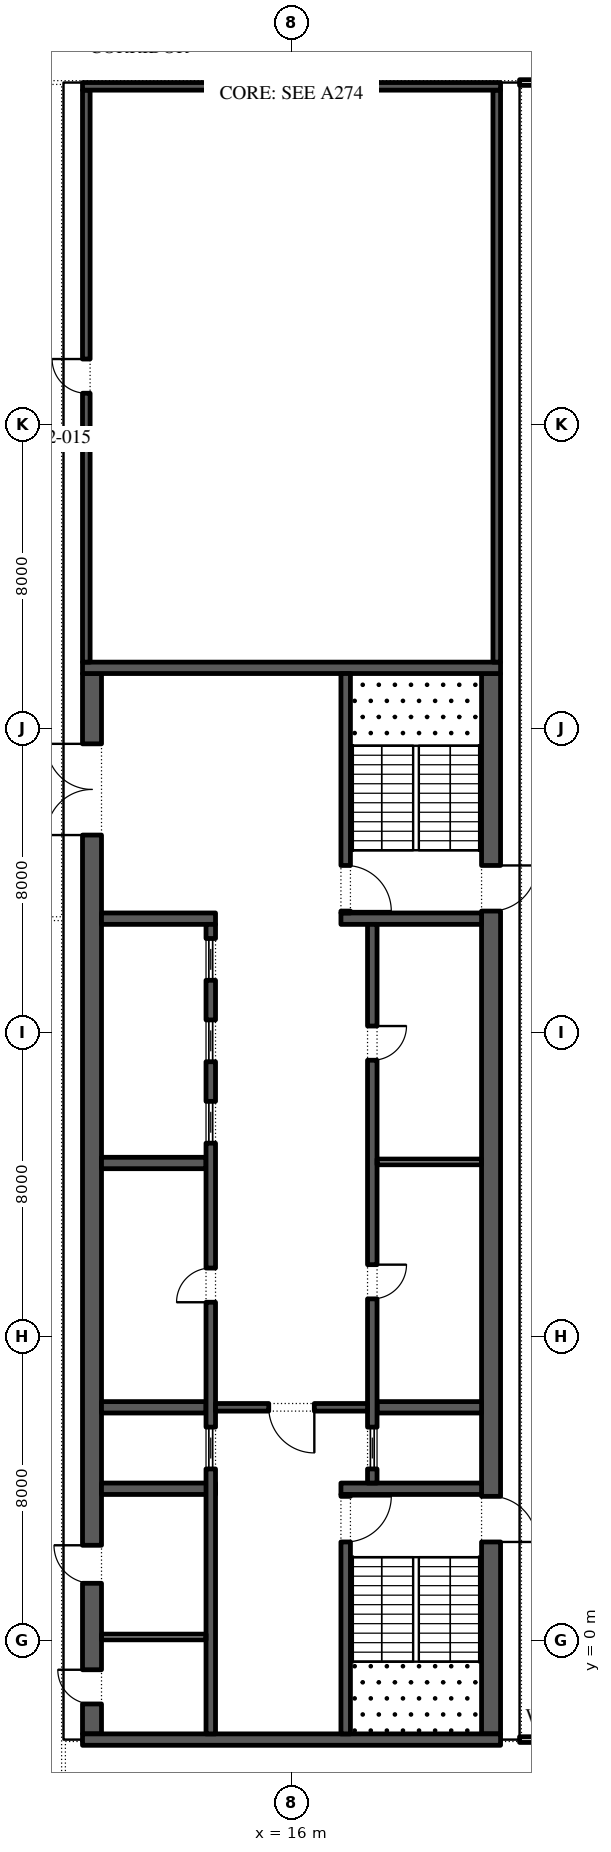
"""IFC4 building model, lengths in metres.
Left out: names, types, materials, properties, quantities, classifications, styles, units other than length and angle.
Written with IfcOpenShell. Run it as: python <this file> out.ifc"""

import sys

from ifc_helpers import new_model, si_unit, direction, frame, frame_2d, origin, place, context, subcontext, project, spatial, rectangle, extrude, element, fill, save


model = new_model("IFC4")
c1 = context("Model", 3, precision=1e-05, world=origin(), true_north=direction((0.0, 1.0)))
c2 = subcontext(c1, "Body", "Model", "MODEL_VIEW")
j1 = project(units=[si_unit("LENGTHUNIT", "METRE"), si_unit("PLANEANGLEUNIT", "RADIAN")], contexts=[c1])
p1 = place(None, origin())
s1 = spatial("IfcSite", under=j1, at=p1, CompositionType="ELEMENT")
p2 = place(p1, origin())
s2 = spatial("IfcBuilding", under=s1, at=p2, CompositionType="ELEMENT")
p3 = place(p2, frame((0.0, 0.0, 325.8)))
s3 = spatial("IfcBuildingStorey", under=s2, at=p3, CompositionType="ELEMENT", Elevation=325.8)
p4 = place(p3, frame((21.25, -2.45, 0.0), z_axis=(0.0, 0.0, 1.0), x_axis=(0.0, 1.0, 0.0)))
e1 = element("IfcWall", 1, at=p4, inside=s3, PredefinedType="SHEAR", context=c2, shape_type="SweptSolid", body=[
    extrude(rectangle(XDim=27.9, YDim=0.5, at=frame_2d((13.95, 0.0))), origin(), (0.0, 0.0, 1.0), 4.0),
])
p5 = place(p4, frame((5.05, 0.0, 0.0)))
e2 = element("IfcOpeningElement", 2, at=p5, cuts=e1, PredefinedType="OPENING", context=c2, shape_type="SweptSolid", body=[
    extrude(rectangle(XDim=1.2, YDim=2.1, at=frame_2d((0.6, 1.05))), frame((0.0, 0.26, 0.0), z_axis=(0.0, -1.0, 0.0), x_axis=(1.0, 0.0, 0.0)), (0.0, 0.0, 1.0), 0.52),
])
p6 = place(p4, frame((21.65, 0.0, 0.0)))
e3 = element("IfcOpeningElement", 3, at=p6, cuts=e1, PredefinedType="OPENING", context=c2, shape_type="SweptSolid", body=[
    extrude(rectangle(XDim=1.2, YDim=2.1, at=frame_2d((0.6, 1.05))), frame((0.0, 0.26, 0.0), z_axis=(0.0, -1.0, 0.0), x_axis=(1.0, 0.0, 0.0)), (0.0, 0.0, 1.0), 0.52),
])
p7 = place(p3, frame((10.75, -2.45, 0.0), z_axis=(0.0, 0.0, 1.0), x_axis=(0.0, 1.0, 0.0)))
e4 = element("IfcWall", 4, at=p7, inside=s3, PredefinedType="SHEAR", context=c2, shape_type="SweptSolid", body=[
    extrude(rectangle(XDim=27.9, YDim=0.5, at=frame_2d((13.95, 0.0))), origin(), (0.0, 0.0, 1.0), 4.0),
])
p8 = place(p7, frame((23.65, 0.0, 0.0)))
e5 = element("IfcOpeningElement", 5, at=p8, cuts=e4, PredefinedType="OPENING", context=c2, shape_type="SweptSolid", body=[
    extrude(rectangle(XDim=2.4, YDim=2.1, at=frame_2d((1.2, 1.05))), frame((0.0, 0.26, 0.0), z_axis=(0.0, -1.0, 0.0), x_axis=(1.0, 0.0, 0.0)), (0.0, 0.0, 1.0), 0.52),
])
p9 = place(p7, frame((0.788, 0.0, 0.0)))
e6 = element("IfcOpeningElement", 6, at=p9, cuts=e4, PredefinedType="OPENING", context=c2, shape_type="SweptSolid", body=[
    extrude(rectangle(XDim=0.9, YDim=2.1, at=frame_2d((0.45, 1.05))), frame((0.0, 0.26, 0.0), z_axis=(0.0, -1.0, 0.0), x_axis=(1.0, 0.0, 0.0)), (0.0, 0.0, 1.0), 0.52),
])
p10 = place(p7, frame((3.962, 0.0, 0.0)))
e7 = element("IfcOpeningElement", 7, at=p10, cuts=e4, PredefinedType="OPENING", context=c2, shape_type="SweptSolid", body=[
    extrude(rectangle(XDim=1.0, YDim=2.1, at=frame_2d((0.5, 1.05))), frame((0.0, 0.26, 0.0), z_axis=(0.0, -1.0, 0.0), x_axis=(1.0, 0.0, 0.0)), (0.0, 0.0, 1.0), 0.52),
])
for number, where, z_axis, x_axis in (
    (8, (10.5, -2.6, 0.0), (0.0, 0.0, 1.0), (1.0, 0.0, 0.0)),
    (9, (10.5, 25.6, 0.0), (0.0, 0.0, 1.0), (1.0, 0.0, 0.0)),
):
    element("IfcWall", number, at=place(p3, frame(where, z_axis=z_axis, x_axis=x_axis)), inside=s3, PredefinedType="SHEAR", context=c2, shape_type="SweptSolid", body=[
        extrude(rectangle(XDim=11.0, YDim=0.3, at=frame_2d((5.5, 0.0))), origin(), (0.0, 0.0, 1.0), 4.0),
    ])
p11 = place(p3, frame((17.3, 4.0, 0.0), z_axis=(0.0, 0.0, 1.0), x_axis=(1.0, 0.0, 0.0)))
e10 = element("IfcWall", 10, at=p11, inside=s3, PredefinedType="SHEAR", context=c2, shape_type="SweptSolid", body=[
    extrude(rectangle(XDim=3.7, YDim=0.3, at=frame_2d((1.85, 0.0))), origin(), (0.0, 0.0, 1.0), 4.0),
])
p12 = place(p3, frame((17.425, -2.45, 0.0), z_axis=(0.0, 0.0, 1.0), x_axis=(0.0, 1.0, 0.0)))
e11 = element("IfcWall", 11, at=p12, inside=s3, PredefinedType="SHEAR", context=c2, shape_type="SweptSolid", body=[
    extrude(rectangle(XDim=6.3, YDim=0.25, at=frame_2d((3.15, 0.0))), origin(), (0.0, 0.0, 1.0), 4.0),
])
p13 = place(p12, frame((5.05, 0.0, 0.0)))
e12 = element("IfcOpeningElement", 12, at=p13, cuts=e11, PredefinedType="OPENING", context=c2, shape_type="SweptSolid", body=[
    extrude(rectangle(XDim=1.2, YDim=2.1, at=frame_2d((0.6, 1.05))), frame((0.0, 0.135, 0.0), z_axis=(0.0, -1.0, 0.0), x_axis=(1.0, 0.0, 0.0)), (0.0, 0.0, 1.0), 0.27),
])
p14 = place(p3, frame((17.3, 19.0, 0.0), z_axis=(0.0, 0.0, 1.0), x_axis=(1.0, 0.0, 0.0)))
e13 = element("IfcWall", 13, at=p14, inside=s3, PredefinedType="SHEAR", context=c2, shape_type="SweptSolid", body=[
    extrude(rectangle(XDim=3.7, YDim=0.3, at=frame_2d((1.85, 0.0))), origin(), (0.0, 0.0, 1.0), 4.0),
])
p15 = place(p3, frame((17.425, 19.15, 0.0), z_axis=(0.0, 0.0, 1.0), x_axis=(0.0, 1.0, 0.0)))
e14 = element("IfcWall", 14, at=p15, inside=s3, PredefinedType="SHEAR", context=c2, shape_type="SweptSolid", body=[
    extrude(rectangle(XDim=6.3, YDim=0.25, at=frame_2d((3.15, 0.0))), origin(), (0.0, 0.0, 1.0), 4.0),
])
p16 = place(p15, frame((0.05, 0.0, 0.0)))
e15 = element("IfcOpeningElement", 15, at=p16, cuts=e14, PredefinedType="OPENING", context=c2, shape_type="SweptSolid", body=[
    extrude(rectangle(XDim=1.2, YDim=2.1, at=frame_2d((0.6, 1.05))), frame((0.0, 0.135, 0.0), z_axis=(0.0, -1.0, 0.0), x_axis=(1.0, 0.0, 0.0)), (0.0, 0.0, 1.0), 0.27),
])
p17 = place(p3, frame((18.25, 6.143, 0.0), z_axis=(0.0, 0.0, 1.0), x_axis=(1.0, 0.0, 0.0)))
e16 = element("IfcWall", 16, at=p17, inside=s3, PredefinedType="SHEAR", context=c2, shape_type="SweptSolid", body=[
    extrude(rectangle(XDim=2.75, YDim=0.3, at=frame_2d((1.375, 0.0))), origin(), (0.0, 0.0, 1.0), 4.0),
])
p18 = place(p3, frame((18.125, 4.15, 0.0), z_axis=(0.0, 0.0, 1.0), x_axis=(0.0, 1.0, 0.0)))
e17 = element("IfcWall", 17, at=p18, inside=s3, PredefinedType="SHEAR", context=c2, shape_type="SweptSolid", body=[
    extrude(rectangle(XDim=14.7, YDim=0.25, at=frame_2d((7.35, 0.0))), origin(), (0.0, 0.0, 1.0), 4.0),
])
p19 = place(p18, frame((4.846, 0.0, 0.0)))
e18 = element("IfcOpeningElement", 18, at=p19, cuts=e17, PredefinedType="OPENING", context=c2, shape_type="SweptSolid", body=[
    extrude(rectangle(XDim=0.9, YDim=2.1, at=frame_2d((0.45, 1.05))), frame((0.0, 0.135, 0.0), z_axis=(0.0, -1.0, 0.0), x_axis=(1.0, 0.0, 0.0)), (0.0, 0.0, 1.0), 0.27),
])
p20 = place(p18, frame((11.125, 0.0, 0.0)))
e19 = element("IfcOpeningElement", 19, at=p20, cuts=e17, PredefinedType="OPENING", context=c2, shape_type="SweptSolid", body=[
    extrude(rectangle(XDim=0.9, YDim=2.1, at=frame_2d((0.45, 1.05))), frame((0.0, 0.135, 0.0), z_axis=(0.0, -1.0, 0.0), x_axis=(1.0, 0.0, 0.0)), (0.0, 0.0, 1.0), 0.27),
])
p21 = place(p18, frame((0.371, 0.0, 0.0)))
e20 = element("IfcOpeningElement", 20, at=p21, cuts=e17, PredefinedType="OPENING", context=c2, shape_type="SweptSolid", body=[
    extrude(rectangle(XDim=1.1, YDim=2.1, at=frame_2d((0.55, 1.05))), frame((0.0, 0.135, 0.0), z_axis=(0.0, -1.0, 0.0), x_axis=(1.0, 0.0, 0.0)), (0.0, 0.0, 1.0), 0.27),
])
p22 = place(p3, frame((18.25, 12.6, 0.0), z_axis=(0.0, 0.0, 1.0), x_axis=(1.0, 0.0, 0.0)))
e21 = element("IfcWall", 21, at=p22, inside=s3, PredefinedType="PARTITIONING", context=c2, shape_type="SweptSolid", body=[
    extrude(rectangle(XDim=2.75, YDim=0.15, at=frame_2d((1.375, 0.0))), origin(), (0.0, 0.0, 1.0), 4.0),
])
p23 = place(p3, frame((11.0, 4.0, 0.0), z_axis=(0.0, 0.0, 1.0), x_axis=(1.0, 0.0, 0.0)))
e22 = element("IfcWall", 22, at=p23, inside=s3, PredefinedType="SHEAR", context=c2, shape_type="SweptSolid", body=[
    extrude(rectangle(XDim=3.0, YDim=0.3, at=frame_2d((1.5, 0.0))), origin(), (0.0, 0.0, 1.0), 4.0),
])
for number, where, z_axis, x_axis in (
    (23, (11.0, 6.143, 0.0), (0.0, 0.0, 1.0), (1.0, 0.0, 0.0)),
    (24, (11.0, 12.571, 0.0), (0.0, 0.0, 1.0), (1.0, 0.0, 0.0)),
):
    element("IfcWall", number, at=place(p3, frame(where, z_axis=z_axis, x_axis=x_axis)), inside=s3, PredefinedType="SHEAR", context=c2, shape_type="SweptSolid", body=[
        extrude(rectangle(XDim=2.75, YDim=0.3, at=frame_2d((1.375, 0.0))), origin(), (0.0, 0.0, 1.0), 4.0),
    ])
p24 = place(p3, frame((11.0, 19.0, 0.0), z_axis=(0.0, 0.0, 1.0), x_axis=(1.0, 0.0, 0.0)))
e25 = element("IfcWall", 25, at=p24, inside=s3, PredefinedType="SHEAR", context=c2, shape_type="SweptSolid", body=[
    extrude(rectangle(XDim=3.0, YDim=0.3, at=frame_2d((1.5, 0.0))), origin(), (0.0, 0.0, 1.0), 4.0),
])
p25 = place(p3, frame((13.875, -2.45, 0.0), z_axis=(0.0, 0.0, 1.0), x_axis=(0.0, 1.0, 0.0)))
e26 = element("IfcWall", 26, at=p25, inside=s3, PredefinedType="SHEAR", context=c2, shape_type="SweptSolid", body=[
    extrude(rectangle(XDim=21.3, YDim=0.25, at=frame_2d((10.65, 0.0))), origin(), (0.0, 0.0, 1.0), 4.0),
])
p26 = place(p25, frame((11.357, 0.0, 0.0)))
e27 = element("IfcOpeningElement", 27, at=p26, cuts=e26, PredefinedType="OPENING", context=c2, shape_type="SweptSolid", body=[
    extrude(rectangle(XDim=0.9, YDim=2.1, at=frame_2d((0.45, 1.05))), frame((0.0, 0.135, 0.0), z_axis=(0.0, -1.0, 0.0), x_axis=(1.0, 0.0, 0.0)), (0.0, 0.0, 1.0), 0.27),
])
p27 = place(p25, frame((6.971, 0.0, 0.0)))
e28 = element("IfcOpeningElement", 28, at=p27, cuts=e26, PredefinedType="OPENING", context=c2, shape_type="SweptSolid", body=[
    extrude(rectangle(XDim=1.1, YDim=2.1, at=frame_2d((0.55, 1.05))), frame((0.0, 0.135, 0.0), z_axis=(0.0, -1.0, 0.0), x_axis=(1.0, 0.0, 0.0)), (0.0, 0.0, 1.0), 0.27),
])
p28 = place(p25, frame((15.543, 0.0, 0.0)))
e29 = element("IfcOpeningElement", 29, at=p28, cuts=e26, PredefinedType="OPENING", context=c2, shape_type="SweptSolid", body=[
    extrude(rectangle(XDim=1.1, YDim=2.1, at=frame_2d((0.55, 1.05))), frame((0.0, 0.135, 0.0), z_axis=(0.0, -1.0, 0.0), x_axis=(1.0, 0.0, 0.0)), (0.0, 0.0, 1.0), 0.27),
])
p29 = place(p25, frame((17.686, 0.0, 0.0)))
e30 = element("IfcOpeningElement", 30, at=p29, cuts=e26, PredefinedType="OPENING", context=c2, shape_type="SweptSolid", body=[
    extrude(rectangle(XDim=1.1, YDim=2.1, at=frame_2d((0.55, 1.05))), frame((0.0, 0.135, 0.0), z_axis=(0.0, -1.0, 0.0), x_axis=(1.0, 0.0, 0.0)), (0.0, 0.0, 1.0), 0.27),
])
p30 = place(p25, frame((19.829, 0.0, 0.0)))
e31 = element("IfcOpeningElement", 31, at=p30, cuts=e26, PredefinedType="OPENING", context=c2, shape_type="SweptSolid", body=[
    extrude(rectangle(XDim=1.1, YDim=2.1, at=frame_2d((0.55, 1.05))), frame((0.0, 0.135, 0.0), z_axis=(0.0, -1.0, 0.0), x_axis=(1.0, 0.0, 0.0)), (0.0, 0.0, 1.0), 0.27),
])
p31 = place(p3, frame((14.0, 6.143, 0.0), z_axis=(0.0, 0.0, 1.0), x_axis=(1.0, 0.0, 0.0)))
e32 = element("IfcWall", 32, at=p31, inside=s3, PredefinedType="SHEAR", context=c2, shape_type="SweptSolid", body=[
    extrude(rectangle(XDim=4.0, YDim=0.2, at=frame_2d((2.0, 0.0))), origin(), (0.0, 0.0, 1.0), 4.0),
])
p32 = place(p31, frame((1.4, 0.0, 0.0)))
e33 = element("IfcOpeningElement", 33, at=p32, cuts=e32, PredefinedType="OPENING", context=c2, shape_type="SweptSolid", body=[
    extrude(rectangle(XDim=1.2, YDim=2.1, at=frame_2d((0.6, 1.05))), frame((0.0, 0.11, 0.0), z_axis=(0.0, -1.0, 0.0), x_axis=(1.0, 0.0, 0.0)), (0.0, 0.0, 1.0), 0.22),
])
p33 = place(p3, frame((11.0, 0.1, 0.0), z_axis=(0.0, 0.0, 1.0), x_axis=(1.0, 0.0, 0.0)))
e34 = element("IfcWall", 34, at=p33, inside=s3, PredefinedType="PARTITIONING", context=c2, shape_type="SweptSolid", body=[
    extrude(rectangle(XDim=2.75, YDim=0.15, at=frame_2d((1.375, 0.0))), origin(), (0.0, 0.0, 1.0), 4.0),
])
p34 = place(p3, frame((21.4, 25.75, 0.0), z_axis=(0.0, 0.0, 1.0), x_axis=(0.0, 1.0, 0.0)))
e35 = element("IfcWall", 35, at=p34, inside=s3, PredefinedType="SHEAR", context=c2, shape_type="SweptSolid", body=[
    extrude(rectangle(XDim=15.05, YDim=0.2, at=frame_2d((7.525, 0.0))), origin(), (0.0, 0.0, 1.0), 4.0),
])
p35 = place(p3, frame((10.6, 25.75, 0.0), z_axis=(0.0, 0.0, 1.0), x_axis=(0.0, 1.0, 0.0)))
e36 = element("IfcWall", 36, at=p35, inside=s3, PredefinedType="SHEAR", context=c2, shape_type="SweptSolid", body=[
    extrude(rectangle(XDim=15.05, YDim=0.2, at=frame_2d((7.525, 0.0))), origin(), (0.0, 0.0, 1.0), 4.0),
])
p36 = place(p35, frame((7.075, 0.0, 0.0)))
e37 = element("IfcOpeningElement", 37, at=p36, cuts=e36, PredefinedType="OPENING", context=c2, shape_type="SweptSolid", body=[
    extrude(rectangle(XDim=0.9, YDim=2.1, at=frame_2d((0.45, 1.05))), frame((0.0, 0.11, 0.0), z_axis=(0.0, -1.0, 0.0), x_axis=(1.0, 0.0, 0.0)), (0.0, 0.0, 1.0), 0.22),
])
p37 = place(p3, frame((10.5, 40.9, 0.0), z_axis=(0.0, 0.0, 1.0), x_axis=(1.0, 0.0, 0.0)))
e38 = element("IfcWall", 38, at=p37, inside=s3, PredefinedType="SHEAR", context=c2, shape_type="SweptSolid", body=[
    extrude(rectangle(XDim=11.0, YDim=0.2, at=frame_2d((5.5, 0.0))), origin(), (0.0, 0.0, 1.0), 4.0),
])
p38 = place(p3, frame((22.0, -2.6, 0.0), z_axis=(0.0, 0.0, 1.0), x_axis=(1.0, 0.0, 0.0)))
e39 = element("IfcWall", 39, at=p38, inside=s3, PredefinedType="PARTITIONING", context=c2, shape_type="SweptSolid", body=[
    extrude(rectangle(XDim=2.25, YDim=0.15, at=frame_2d((1.125, 0.0))), origin(), (0.0, 0.0, 1.0), 4.0),
])
p39 = place(p3, frame((26.05, 41.0, 0.0), z_axis=(0.0, 0.0, 1.0), x_axis=(-1.0, 0.0, 0.0)))
e40 = element("IfcWall", 40, at=p39, inside=s3, PredefinedType="PARTITIONING", context=c2, shape_type="SweptSolid", body=[
    extrude(rectangle(XDim=4.05, YDim=0.15, at=frame_2d((2.025, 0.0))), origin(), (0.0, 0.0, 1.0), 4.0),
])
p40 = place(p39, frame((0.9, 0.0, 0.0)))
e41 = element("IfcOpeningElement", 41, at=p40, cuts=e40, PredefinedType="OPENING", context=c2, shape_type="SweptSolid", body=[
    extrude(rectangle(XDim=1.0, YDim=2.1, at=frame_2d((0.5, 1.05))), frame((0.0, 0.085, 0.0), z_axis=(0.0, -1.0, 0.0), x_axis=(1.0, 0.0, 0.0)), (0.0, 0.0, 1.0), 0.17),
])
p41 = place(p19, frame((0.9, -0.2, 0.0), z_axis=(0.0, 0.0, 1.0), x_axis=(-1.0, 0.0, 0.0)))
e42 = element("IfcDoor", 42, at=p41, inside=s3, OperationType="SINGLE_SWING_RIGHT", PredefinedType="DOOR", context=c2, shape_type="SweptSolid", body=[
    extrude(rectangle(XDim=0.9, YDim=2.1, at=frame_2d((0.45, 1.05))), frame((0.0, -0.075, 0.0), z_axis=(0.0, -1.0, 0.0), x_axis=(1.0, 0.0, 0.0)), (0.0, 0.0, 1.0), 0.05),
])
fill(e18, e42)
p42 = place(p20, frame((0.9, -0.2, 0.0), z_axis=(0.0, 0.0, 1.0), x_axis=(-1.0, 0.0, 0.0)))
e43 = element("IfcDoor", 43, at=p42, inside=s3, OperationType="SINGLE_SWING_RIGHT", PredefinedType="DOOR", context=c2, shape_type="SweptSolid", body=[
    extrude(rectangle(XDim=0.9, YDim=2.1, at=frame_2d((0.45, 1.05))), frame((0.0, -0.075, 0.0), z_axis=(0.0, -1.0, 0.0), x_axis=(1.0, 0.0, 0.0)), (0.0, 0.0, 1.0), 0.05),
])
fill(e19, e43)
p43 = place(p21, origin())
e44 = element("IfcDoor", 44, at=p43, inside=s3, OperationType="SLIDING_TO_LEFT", PredefinedType="DOOR", context=c2, shape_type="SweptSolid", body=[
    extrude(rectangle(XDim=1.1, YDim=2.1, at=frame_2d((0.55, 1.05))), frame((0.0, 0.025, 0.0), z_axis=(0.0, -1.0, 0.0), x_axis=(1.0, 0.0, 0.0)), (0.0, 0.0, 1.0), 0.05),
])
fill(e20, e44)
p44 = place(p26, origin())
e45 = element("IfcDoor", 45, at=p44, inside=s3, OperationType="SINGLE_SWING_RIGHT", PredefinedType="DOOR", context=c2, shape_type="SweptSolid", body=[
    extrude(rectangle(XDim=0.9, YDim=2.1, at=frame_2d((0.45, 1.05))), frame((0.0, 0.125, 0.0), z_axis=(0.0, -1.0, 0.0), x_axis=(1.0, 0.0, 0.0)), (0.0, 0.0, 1.0), 0.05),
])
fill(e27, e45)
p45 = place(p27, origin())
e46 = element("IfcDoor", 46, at=p45, inside=s3, OperationType="SLIDING_TO_LEFT", PredefinedType="DOOR", context=c2, shape_type="SweptSolid", body=[
    extrude(rectangle(XDim=1.1, YDim=2.1, at=frame_2d((0.55, 1.05))), frame((0.0, 0.025, 0.0), z_axis=(0.0, -1.0, 0.0), x_axis=(1.0, 0.0, 0.0)), (0.0, 0.0, 1.0), 0.05),
])
fill(e28, e46)
p46 = place(p28, origin())
e47 = element("IfcDoor", 47, at=p46, inside=s3, OperationType="SLIDING_TO_LEFT", PredefinedType="DOOR", context=c2, shape_type="SweptSolid", body=[
    extrude(rectangle(XDim=1.1, YDim=2.1, at=frame_2d((0.55, 1.05))), frame((0.0, 0.025, 0.0), z_axis=(0.0, -1.0, 0.0), x_axis=(1.0, 0.0, 0.0)), (0.0, 0.0, 1.0), 0.05),
])
fill(e29, e47)
p47 = place(p29, origin())
e48 = element("IfcDoor", 48, at=p47, inside=s3, OperationType="SLIDING_TO_LEFT", PredefinedType="DOOR", context=c2, shape_type="SweptSolid", body=[
    extrude(rectangle(XDim=1.1, YDim=2.1, at=frame_2d((0.55, 1.05))), frame((0.0, 0.025, 0.0), z_axis=(0.0, -1.0, 0.0), x_axis=(1.0, 0.0, 0.0)), (0.0, 0.0, 1.0), 0.05),
])
fill(e30, e48)
p48 = place(p30, origin())
e49 = element("IfcDoor", 49, at=p48, inside=s3, OperationType="SLIDING_TO_LEFT", PredefinedType="DOOR", context=c2, shape_type="SweptSolid", body=[
    extrude(rectangle(XDim=1.1, YDim=2.1, at=frame_2d((0.55, 1.05))), frame((0.0, 0.025, 0.0), z_axis=(0.0, -1.0, 0.0), x_axis=(1.0, 0.0, 0.0)), (0.0, 0.0, 1.0), 0.05),
])
fill(e31, e49)
p49 = place(p32, frame((1.2, 0.0, 0.0), z_axis=(0.0, 0.0, 1.0), x_axis=(-1.0, 0.0, 0.0)))
e50 = element("IfcDoor", 50, at=p49, inside=s3, OperationType="SINGLE_SWING_RIGHT", PredefinedType="DOOR", context=c2, shape_type="SweptSolid", body=[
    extrude(rectangle(XDim=1.2, YDim=2.1, at=frame_2d((0.6, 1.05))), frame((0.0, 0.025, 0.0), z_axis=(0.0, -1.0, 0.0), x_axis=(1.0, 0.0, 0.0)), (0.0, 0.0, 1.0), 0.05),
])
fill(e33, e50)
p50 = place(p8, origin())
e51 = element("IfcDoor", 51, at=p50, inside=s3, OperationType="DOUBLE_DOOR_SINGLE_SWING", PredefinedType="DOOR", context=c2, shape_type="SweptSolid", body=[
    extrude(rectangle(XDim=2.4, YDim=2.1, at=frame_2d((1.2, 1.05))), frame((0.0, 0.025, 0.0), z_axis=(0.0, -1.0, 0.0), x_axis=(1.0, 0.0, 0.0)), (0.0, 0.0, 1.0), 0.05),
])
fill(e5, e51)
p51 = place(p13, frame((1.2, 0.0, 0.0), z_axis=(0.0, 0.0, 1.0), x_axis=(-1.0, 0.0, 0.0)))
e52 = element("IfcDoor", 52, at=p51, inside=s3, OperationType="SINGLE_SWING_RIGHT", PredefinedType="DOOR", context=c2, shape_type="SweptSolid", body=[
    extrude(rectangle(XDim=1.2, YDim=2.1, at=frame_2d((0.6, 1.05))), frame((0.0, 0.025, 0.0), z_axis=(0.0, -1.0, 0.0), x_axis=(1.0, 0.0, 0.0)), (0.0, 0.0, 1.0), 0.05),
])
fill(e12, e52)
p52 = place(p5, frame((1.2, 0.0, 0.0), z_axis=(0.0, 0.0, 1.0), x_axis=(-1.0, 0.0, 0.0)))
e53 = element("IfcDoor", 53, at=p52, inside=s3, OperationType="SINGLE_SWING_LEFT", PredefinedType="DOOR", context=c2, shape_type="SweptSolid", body=[
    extrude(rectangle(XDim=1.2, YDim=2.1, at=frame_2d((0.6, 1.05))), frame((0.0, 0.025, 0.0), z_axis=(0.0, -1.0, 0.0), x_axis=(1.0, 0.0, 0.0)), (0.0, 0.0, 1.0), 0.05),
])
fill(e2, e53)
p53 = place(p16, frame((1.2, 0.0, 0.0), z_axis=(0.0, 0.0, 1.0), x_axis=(-1.0, 0.0, 0.0)))
e54 = element("IfcDoor", 54, at=p53, inside=s3, OperationType="SINGLE_SWING_LEFT", PredefinedType="DOOR", context=c2, shape_type="SweptSolid", body=[
    extrude(rectangle(XDim=1.2, YDim=2.1, at=frame_2d((0.6, 1.05))), frame((0.0, 0.025, 0.0), z_axis=(0.0, -1.0, 0.0), x_axis=(1.0, 0.0, 0.0)), (0.0, 0.0, 1.0), 0.05),
])
fill(e15, e54)
p54 = place(p6, frame((1.2, 0.0, 0.0), z_axis=(0.0, 0.0, 1.0), x_axis=(-1.0, 0.0, 0.0)))
e55 = element("IfcDoor", 55, at=p54, inside=s3, OperationType="SINGLE_SWING_RIGHT", PredefinedType="DOOR", context=c2, shape_type="SweptSolid", body=[
    extrude(rectangle(XDim=1.2, YDim=2.1, at=frame_2d((0.6, 1.05))), frame((0.0, 0.025, 0.0), z_axis=(0.0, -1.0, 0.0), x_axis=(1.0, 0.0, 0.0)), (0.0, 0.0, 1.0), 0.05),
])
fill(e3, e55)
p55 = place(p9, origin())
e56 = element("IfcDoor", 56, at=p55, inside=s3, OperationType="SINGLE_SWING_LEFT", PredefinedType="DOOR", context=c2, shape_type="SweptSolid", body=[
    extrude(rectangle(XDim=0.9, YDim=2.1, at=frame_2d((0.45, 1.05))), frame((0.0, -0.2, 0.0), z_axis=(0.0, -1.0, 0.0), x_axis=(1.0, 0.0, 0.0)), (0.0, 0.0, 1.0), 0.05),
])
fill(e6, e56)
p56 = place(p10, origin())
e57 = element("IfcDoor", 57, at=p56, inside=s3, OperationType="SINGLE_SWING_LEFT", PredefinedType="DOOR", context=c2, shape_type="SweptSolid", body=[
    extrude(rectangle(XDim=1.0, YDim=2.1, at=frame_2d((0.5, 1.05))), frame((0.0, -0.2, 0.0), z_axis=(0.0, -1.0, 0.0), x_axis=(1.0, 0.0, 0.0)), (0.0, 0.0, 1.0), 0.05),
])
fill(e7, e57)
p57 = place(p36, origin())
e58 = element("IfcDoor", 58, at=p57, inside=s3, OperationType="SINGLE_SWING_LEFT", PredefinedType="DOOR", context=c2, shape_type="SweptSolid", body=[
    extrude(rectangle(XDim=0.9, YDim=2.1, at=frame_2d((0.45, 1.05))), frame((0.0, -0.05, 0.0), z_axis=(0.0, -1.0, 0.0), x_axis=(1.0, 0.0, 0.0)), (0.0, 0.0, 1.0), 0.05),
])
fill(e37, e58)
save(model, sys.argv[1])
